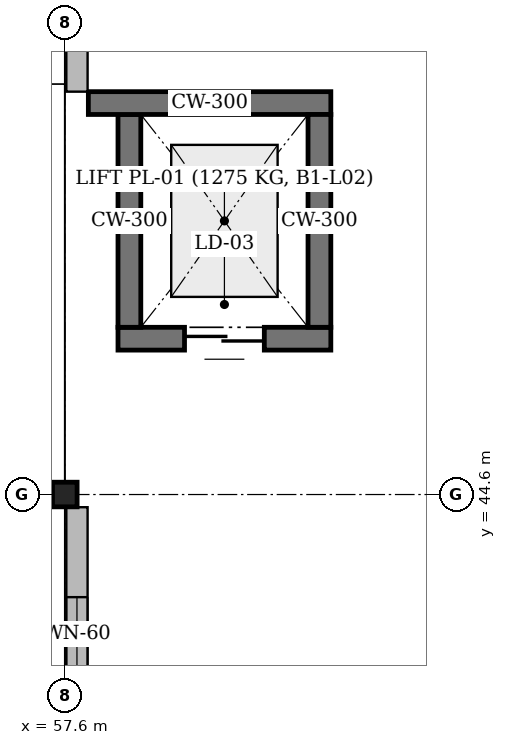
"""IFC4 building model, lengths in metres.
Left out: names, types, materials, properties, quantities, classifications, styles, units other than length and angle.
Written with IfcOpenShell. Run it as: python <this file> out.ifc"""

import sys

from ifc_helpers import new_model, si_unit, direction, frame, frame_2d, origin, origin_2d, place, context, subcontext, project, spatial, rectangle, hollow_circle, extrude, element, fill, save


model = new_model("IFC4")
c1 = context("Model", 3, precision=1e-05, world=origin(), true_north=direction((0.0, 1.0)))
c2 = subcontext(c1, "Body", "Model", "MODEL_VIEW")
j1 = project(units=[si_unit("LENGTHUNIT", "METRE"), si_unit("PLANEANGLEUNIT", "RADIAN")], contexts=[c1])
p1 = place(None, origin())
s1 = spatial("IfcSite", under=j1, at=p1, CompositionType="ELEMENT")
p2 = place(p1, origin())
s2 = spatial("IfcBuilding", under=s1, at=p2, CompositionType="ELEMENT")
p3 = place(p2, frame((0.0, 0.0, 4.8)))
s3 = spatial("IfcBuildingStorey", under=s2, at=p3, CompositionType="ELEMENT", Elevation=4.8)
p4 = place(p3, frame((57.6, 44.6, 0.0), z_axis=(0.0, 0.0, 1.0), x_axis=(1.0, 0.0, 0.0)))
e1 = element("IfcColumn", 1, at=p4, inside=s3, PredefinedType="COLUMN", context=c2, shape_type="SweptSolid", body=[
    extrude(hollow_circle(Radius=0.162, WallThickness=0.012, at=origin_2d()), origin(), (0.0, 0.0, 1.0), 4.2),
])
p5 = place(p3, frame((61.1, 46.65, 0.0), z_axis=(0.0, 0.0, 1.0), x_axis=(-1.0, 0.0, 0.0)))
e2 = element("IfcWall", 2, at=p5, inside=s3, PredefinedType="SOLIDWALL", context=c2, shape_type="SweptSolid", body=[
    extrude(rectangle(XDim=2.8, YDim=0.3, at=frame_2d((1.4, 0.0))), origin(), (0.0, 0.0, 1.0), 4.2),
])
p6 = place(p5, frame((0.875, 0.0, 0.0)))
e3 = element("IfcOpeningElement", 3, at=p6, cuts=e2, PredefinedType="OPENING", context=c2, shape_type="SweptSolid", body=[
    extrude(rectangle(XDim=1.05, YDim=2.1, at=frame_2d((0.525, 1.05))), frame((0.0, 0.17, 0.0), z_axis=(0.0, -1.0, 0.0), x_axis=(1.0, 0.0, 0.0)), (0.0, 0.0, 1.0), 0.34),
])
p7 = place(p3, frame((58.45, 46.8, 0.0), z_axis=(0.0, 0.0, 1.0), x_axis=(0.0, 1.0, 0.0)))
e4 = element("IfcWall", 4, at=p7, inside=s3, PredefinedType="SOLIDWALL", context=c2, shape_type="SweptSolid", body=[
    extrude(rectangle(XDim=2.8, YDim=0.3, at=frame_2d((1.4, 0.0))), origin(), (0.0, 0.0, 1.0), 4.2),
])
p8 = place(p3, frame((57.91, 49.75, 0.0), z_axis=(0.0, 0.0, 1.0), x_axis=(1.0, 0.0, 0.0)))
e5 = element("IfcWall", 5, at=p8, inside=s3, PredefinedType="SOLIDWALL", context=c2, shape_type="SweptSolid", body=[
    extrude(rectangle(XDim=3.19, YDim=0.3, at=frame_2d((1.595, 0.0))), origin(), (0.0, 0.0, 1.0), 4.2),
])
p9 = place(p3, frame((60.95, 49.6, 0.0), z_axis=(0.0, 0.0, 1.0), x_axis=(0.0, -1.0, 0.0)))
e6 = element("IfcWall", 6, at=p9, inside=s3, PredefinedType="SOLIDWALL", context=c2, shape_type="SweptSolid", body=[
    extrude(rectangle(XDim=2.8, YDim=0.3, at=frame_2d((1.4, 0.0))), origin(), (0.0, 0.0, 1.0), 4.2),
])
p10 = place(p3, frame((57.76, 37.78, 0.0), z_axis=(0.0, 0.0, 1.0), x_axis=(0.0, 1.0, 0.0)))
e7 = element("IfcWall", 7, at=p10, inside=s3, PredefinedType="SOLIDWALL", context=c2, shape_type="SweptSolid", body=[
    extrude(rectangle(XDim=6.653, YDim=0.28, at=frame_2d((3.327, 0.0))), origin(), (0.0, 0.0, 1.0), 3.653),
])
p11 = place(p10, frame((1.183, 0.0, 0.95)))
e8 = element("IfcOpeningElement", 8, at=p11, cuts=e7, PredefinedType="OPENING", context=c2, shape_type="SweptSolid", body=[
    extrude(rectangle(XDim=0.96, YDim=1.8, at=frame_2d((0.48, 0.9))), frame((0.0, 0.16, 0.0), z_axis=(0.0, -1.0, 0.0), x_axis=(1.0, 0.0, 0.0)), (0.0, 0.0, 1.0), 0.32),
])
p12 = place(p10, frame((4.51, 0.0, 0.95)))
e9 = element("IfcOpeningElement", 9, at=p12, cuts=e7, PredefinedType="OPENING", context=c2, shape_type="SweptSolid", body=[
    extrude(rectangle(XDim=0.96, YDim=1.8, at=frame_2d((0.48, 0.9))), frame((0.0, 0.16, 0.0), z_axis=(0.0, -1.0, 0.0), x_axis=(1.0, 0.0, 0.0)), (0.0, 0.0, 1.0), 0.32),
])
p13 = place(p3, frame((57.76, 49.9, 0.0), z_axis=(0.0, 0.0, 1.0), x_axis=(0.0, 1.0, 0.0)))
e10 = element("IfcWall", 10, at=p13, inside=s3, PredefinedType="SOLIDWALL", context=c2, shape_type="SweptSolid", body=[
    extrude(rectangle(XDim=1.95, YDim=0.28, at=frame_2d((0.975, 0.0))), origin(), (0.0, 0.0, 1.0), 2.723),
])
p14 = place(p6, origin())
e11 = element("IfcDoor", 11, at=p14, inside=s3, OperationType="DOUBLE_DOOR_SLIDING", PredefinedType="DOOR", context=c2, shape_type="SweptSolid", body=[
    extrude(rectangle(XDim=1.05, YDim=2.1, at=frame_2d((0.525, 1.05))), frame((0.0, 0.025, 0.0), z_axis=(0.0, -1.0, 0.0), x_axis=(1.0, 0.0, 0.0)), (0.0, 0.0, 1.0), 0.05),
])
fill(e3, e11)
p15 = place(p12, origin())
e12 = element("IfcWindow", 12, at=p15, inside=s3, PartitioningType="SINGLE_PANEL", PredefinedType="WINDOW", context=c2, shape_type="SweptSolid", body=[
    extrude(rectangle(XDim=0.96, YDim=1.8, at=frame_2d((0.48, 0.9))), frame((0.0, 0.03, 0.0), z_axis=(0.0, -1.0, 0.0), x_axis=(1.0, 0.0, 0.0)), (0.0, 0.0, 1.0), 0.06),
])
fill(e9, e12)
save(model, sys.argv[1])
